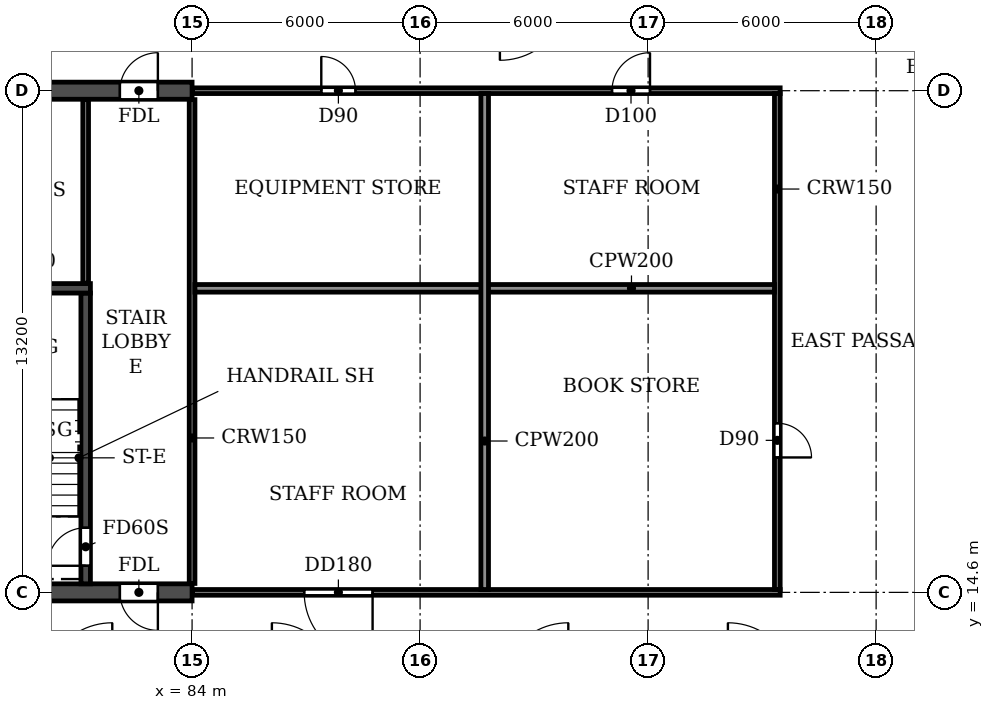
"""IFC4 building model, lengths in metres.
Left out: names, types, materials, properties, quantities, classifications, styles, units other than length and angle.
Written with IfcOpenShell. Run it as: python <this file> out.ifc"""

import sys

from ifc_helpers import new_model, si_unit, direction, frame, frame_2d, origin, place, context, subcontext, project, spatial, rectangle, extrude, element, fill, save


model = new_model("IFC4")
c1 = context("Model", 3, precision=1e-05, world=origin(), true_north=direction((0.0, 1.0)))
c2 = subcontext(c1, "Body", "Model", "MODEL_VIEW")
j1 = project(units=[si_unit("LENGTHUNIT", "METRE"), si_unit("PLANEANGLEUNIT", "RADIAN")], contexts=[c1])
p1 = place(None, origin())
s1 = spatial("IfcSite", under=j1, at=p1, CompositionType="ELEMENT")
p2 = place(p1, origin())
s2 = spatial("IfcBuilding", under=s1, at=p2, CompositionType="ELEMENT")
p3 = place(p2, frame((0.0, 0.0, 15.0)))
s3 = spatial("IfcBuildingStorey", under=s2, at=p3, CompositionType="ELEMENT", Elevation=15.0)
p4 = place(p3, frame((18.0, 14.6, 0.0), z_axis=(0.0, 0.0, 1.0), x_axis=(1.0, 0.0, 0.0)))
e1 = element("IfcWall", 1, at=p4, inside=s3, PredefinedType="SOLIDWALL", context=c2, shape_type="SweptSolid", body=[
    extrude(rectangle(XDim=66.0, YDim=0.45, at=frame_2d((33.0, 0.0))), origin(), (0.0, 0.0, 1.0), 3.92),
])
p5 = place(p4, frame((0.9, 0.0, 0.0)))
e2 = element("IfcOpeningElement", 2, at=p5, cuts=e1, PredefinedType="OPENING", context=c2, shape_type="SweptSolid", body=[
    extrude(rectangle(XDim=1.0, YDim=2.1, at=frame_2d((0.5, 1.05))), frame((0.0, 0.235, 0.0), z_axis=(0.0, -1.0, 0.0), x_axis=(1.0, 0.0, 0.0)), (0.0, 0.0, 1.0), 0.47),
])
p6 = place(p4, frame((8.8, 0.0, 0.0)))
e3 = element("IfcOpeningElement", 3, at=p6, cuts=e1, PredefinedType="OPENING", context=c2, shape_type="SweptSolid", body=[
    extrude(rectangle(XDim=1.0, YDim=2.1, at=frame_2d((0.5, 1.05))), frame((0.0, 0.235, 0.0), z_axis=(0.0, -1.0, 0.0), x_axis=(1.0, 0.0, 0.0)), (0.0, 0.0, 1.0), 0.47),
])
p7 = place(p4, frame((13.4, 0.0, 0.0)))
e4 = element("IfcOpeningElement", 4, at=p7, cuts=e1, PredefinedType="OPENING", context=c2, shape_type="SweptSolid", body=[
    extrude(rectangle(XDim=1.0, YDim=2.1, at=frame_2d((0.5, 1.05))), frame((0.0, 0.235, 0.0), z_axis=(0.0, -1.0, 0.0), x_axis=(1.0, 0.0, 0.0)), (0.0, 0.0, 1.0), 0.47),
])
p8 = place(p4, frame((26.0, 0.0, 0.0)))
e5 = element("IfcOpeningElement", 5, at=p8, cuts=e1, PredefinedType="OPENING", context=c2, shape_type="SweptSolid", body=[
    extrude(rectangle(XDim=1.0, YDim=2.1, at=frame_2d((0.5, 1.05))), frame((0.0, 0.235, 0.0), z_axis=(0.0, -1.0, 0.0), x_axis=(1.0, 0.0, 0.0)), (0.0, 0.0, 1.0), 0.47),
])
p9 = place(p4, frame((29.9, 0.0, 0.0)))
e6 = element("IfcOpeningElement", 6, at=p9, cuts=e1, PredefinedType="OPENING", context=c2, shape_type="SweptSolid", body=[
    extrude(rectangle(XDim=1.0, YDim=2.1, at=frame_2d((0.5, 1.05))), frame((0.0, 0.235, 0.0), z_axis=(0.0, -1.0, 0.0), x_axis=(1.0, 0.0, 0.0)), (0.0, 0.0, 1.0), 0.47),
])
p10 = place(p4, frame((32.5, 0.0, 0.0)))
e7 = element("IfcOpeningElement", 7, at=p10, cuts=e1, PredefinedType="OPENING", context=c2, shape_type="SweptSolid", body=[
    extrude(rectangle(XDim=1.0, YDim=2.1, at=frame_2d((0.5, 1.05))), frame((0.0, 0.235, 0.0), z_axis=(0.0, -1.0, 0.0), x_axis=(1.0, 0.0, 0.0)), (0.0, 0.0, 1.0), 0.47),
])
p11 = place(p4, frame((35.1, 0.0, 0.0)))
e8 = element("IfcOpeningElement", 8, at=p11, cuts=e1, PredefinedType="OPENING", context=c2, shape_type="SweptSolid", body=[
    extrude(rectangle(XDim=1.0, YDim=2.1, at=frame_2d((0.5, 1.05))), frame((0.0, 0.235, 0.0), z_axis=(0.0, -1.0, 0.0), x_axis=(1.0, 0.0, 0.0)), (0.0, 0.0, 1.0), 0.47),
])
p12 = place(p4, frame((39.0, 0.0, 0.0)))
e9 = element("IfcOpeningElement", 9, at=p12, cuts=e1, PredefinedType="OPENING", context=c2, shape_type="SweptSolid", body=[
    extrude(rectangle(XDim=1.0, YDim=2.1, at=frame_2d((0.5, 1.05))), frame((0.0, 0.235, 0.0), z_axis=(0.0, -1.0, 0.0), x_axis=(1.0, 0.0, 0.0)), (0.0, 0.0, 1.0), 0.47),
])
p13 = place(p4, frame((51.6, 0.0, 0.0)))
e10 = element("IfcOpeningElement", 10, at=p13, cuts=e1, PredefinedType="OPENING", context=c2, shape_type="SweptSolid", body=[
    extrude(rectangle(XDim=1.0, YDim=2.1, at=frame_2d((0.5, 1.05))), frame((0.0, 0.235, 0.0), z_axis=(0.0, -1.0, 0.0), x_axis=(1.0, 0.0, 0.0)), (0.0, 0.0, 1.0), 0.47),
])
p14 = place(p4, frame((56.25, 0.0, 0.0)))
e11 = element("IfcOpeningElement", 11, at=p14, cuts=e1, PredefinedType="OPENING", context=c2, shape_type="SweptSolid", body=[
    extrude(rectangle(XDim=0.9, YDim=2.1, at=frame_2d((0.45, 1.05))), frame((0.0, 0.235, 0.0), z_axis=(0.0, -1.0, 0.0), x_axis=(1.0, 0.0, 0.0)), (0.0, 0.0, 1.0), 0.47),
])
p15 = place(p4, frame((64.1, 0.0, 0.0)))
e12 = element("IfcOpeningElement", 12, at=p15, cuts=e1, PredefinedType="OPENING", context=c2, shape_type="SweptSolid", body=[
    extrude(rectangle(XDim=1.0, YDim=2.1, at=frame_2d((0.5, 1.05))), frame((0.0, 0.235, 0.0), z_axis=(0.0, -1.0, 0.0), x_axis=(1.0, 0.0, 0.0)), (0.0, 0.0, 1.0), 0.47),
])
p16 = place(p3, frame((18.0, 27.8, 0.0), z_axis=(0.0, 0.0, 1.0), x_axis=(1.0, 0.0, 0.0)))
e13 = element("IfcWall", 13, at=p16, inside=s3, PredefinedType="SOLIDWALL", context=c2, shape_type="SweptSolid", body=[
    extrude(rectangle(XDim=66.0, YDim=0.45, at=frame_2d((33.0, 0.0))), origin(), (0.0, 0.0, 1.0), 3.92),
])
p17 = place(p16, frame((0.9, 0.0, 0.0)))
e14 = element("IfcOpeningElement", 14, at=p17, cuts=e13, PredefinedType="OPENING", context=c2, shape_type="SweptSolid", body=[
    extrude(rectangle(XDim=1.0, YDim=2.1, at=frame_2d((0.5, 1.05))), frame((0.0, 0.235, 0.0), z_axis=(0.0, -1.0, 0.0), x_axis=(1.0, 0.0, 0.0)), (0.0, 0.0, 1.0), 0.47),
])
p18 = place(p16, frame((4.25, 0.0, 0.0)))
e15 = element("IfcOpeningElement", 15, at=p18, cuts=e13, PredefinedType="OPENING", context=c2, shape_type="SweptSolid", body=[
    extrude(rectangle(XDim=0.9, YDim=2.1, at=frame_2d((0.45, 1.05))), frame((0.0, 0.235, 0.0), z_axis=(0.0, -1.0, 0.0), x_axis=(1.0, 0.0, 0.0)), (0.0, 0.0, 1.0), 0.47),
])
p19 = place(p16, frame((8.85, 0.0, 0.0)))
e16 = element("IfcOpeningElement", 16, at=p19, cuts=e13, PredefinedType="OPENING", context=c2, shape_type="SweptSolid", body=[
    extrude(rectangle(XDim=0.9, YDim=2.1, at=frame_2d((0.45, 1.05))), frame((0.0, 0.235, 0.0), z_axis=(0.0, -1.0, 0.0), x_axis=(1.0, 0.0, 0.0)), (0.0, 0.0, 1.0), 0.47),
])
p20 = place(p16, frame((13.45, 0.0, 0.0)))
e17 = element("IfcOpeningElement", 17, at=p20, cuts=e13, PredefinedType="OPENING", context=c2, shape_type="SweptSolid", body=[
    extrude(rectangle(XDim=0.9, YDim=2.1, at=frame_2d((0.45, 1.05))), frame((0.0, 0.235, 0.0), z_axis=(0.0, -1.0, 0.0), x_axis=(1.0, 0.0, 0.0)), (0.0, 0.0, 1.0), 0.47),
])
p21 = place(p16, frame((16.6, 0.0, 0.0)))
e18 = element("IfcOpeningElement", 18, at=p21, cuts=e13, PredefinedType="OPENING", context=c2, shape_type="SweptSolid", body=[
    extrude(rectangle(XDim=1.0, YDim=2.1, at=frame_2d((0.5, 1.05))), frame((0.0, 0.235, 0.0), z_axis=(0.0, -1.0, 0.0), x_axis=(1.0, 0.0, 0.0)), (0.0, 0.0, 1.0), 0.47),
])
p22 = place(p16, frame((21.8, 0.0, 0.0)))
e19 = element("IfcOpeningElement", 19, at=p22, cuts=e13, PredefinedType="OPENING", context=c2, shape_type="SweptSolid", body=[
    extrude(rectangle(XDim=1.0, YDim=2.1, at=frame_2d((0.5, 1.05))), frame((0.0, 0.235, 0.0), z_axis=(0.0, -1.0, 0.0), x_axis=(1.0, 0.0, 0.0)), (0.0, 0.0, 1.0), 0.47),
])
p23 = place(p16, frame((29.6, 0.0, 0.0)))
e20 = element("IfcOpeningElement", 20, at=p23, cuts=e13, PredefinedType="OPENING", context=c2, shape_type="SweptSolid", body=[
    extrude(rectangle(XDim=1.0, YDim=2.1, at=frame_2d((0.5, 1.05))), frame((0.0, 0.235, 0.0), z_axis=(0.0, -1.0, 0.0), x_axis=(1.0, 0.0, 0.0)), (0.0, 0.0, 1.0), 0.47),
])
p24 = place(p16, frame((32.5, 0.0, 0.0)))
e21 = element("IfcOpeningElement", 21, at=p24, cuts=e13, PredefinedType="OPENING", context=c2, shape_type="SweptSolid", body=[
    extrude(rectangle(XDim=1.0, YDim=2.1, at=frame_2d((0.5, 1.05))), frame((0.0, 0.235, 0.0), z_axis=(0.0, -1.0, 0.0), x_axis=(1.0, 0.0, 0.0)), (0.0, 0.0, 1.0), 0.47),
])
p25 = place(p16, frame((35.4, 0.0, 0.0)))
e22 = element("IfcOpeningElement", 22, at=p25, cuts=e13, PredefinedType="OPENING", context=c2, shape_type="SweptSolid", body=[
    extrude(rectangle(XDim=1.0, YDim=2.1, at=frame_2d((0.5, 1.05))), frame((0.0, 0.235, 0.0), z_axis=(0.0, -1.0, 0.0), x_axis=(1.0, 0.0, 0.0)), (0.0, 0.0, 1.0), 0.47),
])
p26 = place(p16, frame((39.3, 0.0, 0.0)))
e23 = element("IfcOpeningElement", 23, at=p26, cuts=e13, PredefinedType="OPENING", context=c2, shape_type="SweptSolid", body=[
    extrude(rectangle(XDim=1.0, YDim=2.1, at=frame_2d((0.5, 1.05))), frame((0.0, 0.235, 0.0), z_axis=(0.0, -1.0, 0.0), x_axis=(1.0, 0.0, 0.0)), (0.0, 0.0, 1.0), 0.47),
])
p27 = place(p16, frame((43.2, 0.0, 0.0)))
e24 = element("IfcOpeningElement", 24, at=p27, cuts=e13, PredefinedType="OPENING", context=c2, shape_type="SweptSolid", body=[
    extrude(rectangle(XDim=1.0, YDim=2.1, at=frame_2d((0.5, 1.05))), frame((0.0, 0.235, 0.0), z_axis=(0.0, -1.0, 0.0), x_axis=(1.0, 0.0, 0.0)), (0.0, 0.0, 1.0), 0.47),
])
p28 = place(p16, frame((45.8, 0.0, 0.0)))
e25 = element("IfcOpeningElement", 25, at=p28, cuts=e13, PredefinedType="OPENING", context=c2, shape_type="SweptSolid", body=[
    extrude(rectangle(XDim=1.0, YDim=2.1, at=frame_2d((0.5, 1.05))), frame((0.0, 0.235, 0.0), z_axis=(0.0, -1.0, 0.0), x_axis=(1.0, 0.0, 0.0)), (0.0, 0.0, 1.0), 0.47),
])
p29 = place(p16, frame((48.4, 0.0, 0.0)))
e26 = element("IfcOpeningElement", 26, at=p29, cuts=e13, PredefinedType="OPENING", context=c2, shape_type="SweptSolid", body=[
    extrude(rectangle(XDim=1.0, YDim=2.1, at=frame_2d((0.5, 1.05))), frame((0.0, 0.235, 0.0), z_axis=(0.0, -1.0, 0.0), x_axis=(1.0, 0.0, 0.0)), (0.0, 0.0, 1.0), 0.47),
])
p30 = place(p16, frame((51.65, 0.0, 0.0)))
e27 = element("IfcOpeningElement", 27, at=p30, cuts=e13, PredefinedType="OPENING", context=c2, shape_type="SweptSolid", body=[
    extrude(rectangle(XDim=0.9, YDim=2.1, at=frame_2d((0.45, 1.05))), frame((0.0, 0.235, 0.0), z_axis=(0.0, -1.0, 0.0), x_axis=(1.0, 0.0, 0.0)), (0.0, 0.0, 1.0), 0.47),
])
p31 = place(p16, frame((56.2, 0.0, 0.0)))
e28 = element("IfcOpeningElement", 28, at=p31, cuts=e13, PredefinedType="OPENING", context=c2, shape_type="SweptSolid", body=[
    extrude(rectangle(XDim=1.0, YDim=2.1, at=frame_2d((0.5, 1.05))), frame((0.0, 0.235, 0.0), z_axis=(0.0, -1.0, 0.0), x_axis=(1.0, 0.0, 0.0)), (0.0, 0.0, 1.0), 0.47),
])
p32 = place(p16, frame((60.85, 0.0, 0.0)))
e29 = element("IfcOpeningElement", 29, at=p32, cuts=e13, PredefinedType="OPENING", context=c2, shape_type="SweptSolid", body=[
    extrude(rectangle(XDim=0.9, YDim=2.1, at=frame_2d((0.45, 1.05))), frame((0.0, 0.235, 0.0), z_axis=(0.0, -1.0, 0.0), x_axis=(1.0, 0.0, 0.0)), (0.0, 0.0, 1.0), 0.47),
])
p33 = place(p16, frame((64.1, 0.0, 0.0)))
e30 = element("IfcOpeningElement", 30, at=p33, cuts=e13, PredefinedType="OPENING", context=c2, shape_type="SweptSolid", body=[
    extrude(rectangle(XDim=1.0, YDim=2.1, at=frame_2d((0.5, 1.05))), frame((0.0, 0.235, 0.0), z_axis=(0.0, -1.0, 0.0), x_axis=(1.0, 0.0, 0.0)), (0.0, 0.0, 1.0), 0.47),
])
p34 = place(p3, frame((81.2, 14.825, 0.0), z_axis=(0.0, 0.0, 1.0), x_axis=(0.0, 1.0, 0.0)))
e31 = element("IfcWall", 31, at=p34, inside=s3, PredefinedType="SOLIDWALL", context=c2, shape_type="SweptSolid", body=[
    extrude(rectangle(XDim=7.65, YDim=0.25, at=frame_2d((3.825, 0.0))), origin(), (0.0, 0.0, 1.0), 3.92),
])
p35 = place(p34, frame((0.475, 0.0, 0.0)))
e32 = element("IfcOpeningElement", 32, at=p35, cuts=e31, PredefinedType="OPENING", context=c2, shape_type="SweptSolid", body=[
    extrude(rectangle(XDim=1.0, YDim=2.1, at=frame_2d((0.5, 1.05))), frame((0.0, 0.135, 0.0), z_axis=(0.0, -1.0, 0.0), x_axis=(1.0, 0.0, 0.0)), (0.0, 0.0, 1.0), 0.27),
])
p36 = place(p3, frame((77.275, 22.6, 0.0), z_axis=(0.0, 0.0, 1.0), x_axis=(1.0, 0.0, 0.0)))
e33 = element("IfcWall", 33, at=p36, inside=s3, PredefinedType="SOLIDWALL", context=c2, shape_type="SweptSolid", body=[
    extrude(rectangle(XDim=4.05, YDim=0.25, at=frame_2d((2.025, 0.0))), origin(), (0.0, 0.0, 1.0), 3.92),
])
p37 = place(p3, frame((84.01, 14.6, 0.0), z_axis=(0.0, 0.0, 1.0), x_axis=(1.0, 0.0, 0.0)))
e34 = element("IfcWall", 34, at=p37, inside=s3, PredefinedType="PARTITIONING", context=c2, shape_type="SweptSolid", body=[
    extrude(rectangle(XDim=15.465, YDim=0.15, at=frame_2d((7.732, 0.0))), origin(), (0.0, 0.0, 1.0), 3.92),
])
p38 = place(p37, frame((2.94, 0.0, 0.0)))
e35 = element("IfcOpeningElement", 35, at=p38, cuts=e34, PredefinedType="OPENING", context=c2, shape_type="SweptSolid", body=[
    extrude(rectangle(XDim=1.8, YDim=2.1, at=frame_2d((0.9, 1.05))), frame((0.0, 0.085, 0.0), z_axis=(0.0, -1.0, 0.0), x_axis=(1.0, 0.0, 0.0)), (0.0, 0.0, 1.0), 0.17),
])
p39 = place(p3, frame((84.01, 27.8, 0.0), z_axis=(0.0, 0.0, 1.0), x_axis=(1.0, 0.0, 0.0)))
e36 = element("IfcWall", 36, at=p39, inside=s3, PredefinedType="PARTITIONING", context=c2, shape_type="SweptSolid", body=[
    extrude(rectangle(XDim=15.465, YDim=0.15, at=frame_2d((7.732, 0.0))), origin(), (0.0, 0.0, 1.0), 3.92),
])
p40 = place(p39, frame((3.39, 0.0, 0.0)))
e37 = element("IfcOpeningElement", 37, at=p40, cuts=e36, PredefinedType="OPENING", context=c2, shape_type="SweptSolid", body=[
    extrude(rectangle(XDim=0.9, YDim=2.1, at=frame_2d((0.45, 1.05))), frame((0.0, 0.085, 0.0), z_axis=(0.0, -1.0, 0.0), x_axis=(1.0, 0.0, 0.0)), (0.0, 0.0, 1.0), 0.17),
])
p41 = place(p39, frame((11.04, 0.0, 0.0)))
e38 = element("IfcOpeningElement", 38, at=p41, cuts=e36, PredefinedType="OPENING", context=c2, shape_type="SweptSolid", body=[
    extrude(rectangle(XDim=1.0, YDim=2.1, at=frame_2d((0.5, 1.05))), frame((0.0, 0.085, 0.0), z_axis=(0.0, -1.0, 0.0), x_axis=(1.0, 0.0, 0.0)), (0.0, 0.0, 1.0), 0.17),
])
p42 = place(p3, frame((84.0, 14.835, 0.0), z_axis=(0.0, 0.0, 1.0), x_axis=(0.0, 1.0, 0.0)))
e39 = element("IfcWall", 39, at=p42, inside=s3, PredefinedType="PARTITIONING", context=c2, shape_type="SweptSolid", body=[
    extrude(rectangle(XDim=12.73, YDim=0.15, at=frame_2d((6.365, 0.0))), origin(), (0.0, 0.0, 1.0), 3.92),
])
p43 = place(p3, frame((99.4, 14.675, 0.0), z_axis=(0.0, 0.0, 1.0), x_axis=(0.0, 1.0, 0.0)))
e40 = element("IfcWall", 40, at=p43, inside=s3, PredefinedType="PARTITIONING", context=c2, shape_type="SweptSolid", body=[
    extrude(rectangle(XDim=13.05, YDim=0.15, at=frame_2d((6.525, 0.0))), origin(), (0.0, 0.0, 1.0), 3.92),
])
p44 = place(p43, frame((3.475, 0.0, 0.0)))
e41 = element("IfcOpeningElement", 41, at=p44, cuts=e40, PredefinedType="OPENING", context=c2, shape_type="SweptSolid", body=[
    extrude(rectangle(XDim=0.9, YDim=2.1, at=frame_2d((0.45, 1.05))), frame((0.0, 0.085, 0.0), z_axis=(0.0, -1.0, 0.0), x_axis=(1.0, 0.0, 0.0)), (0.0, 0.0, 1.0), 0.17),
])
p45 = place(p3, frame((84.075, 22.6, 0.0), z_axis=(0.0, 0.0, 1.0), x_axis=(1.0, 0.0, 0.0)))
e42 = element("IfcWall", 42, at=p45, inside=s3, PredefinedType="PARTITIONING", context=c2, shape_type="SweptSolid", body=[
    extrude(rectangle(XDim=15.25, YDim=0.2, at=frame_2d((7.625, 0.0))), origin(), (0.0, 0.0, 1.0), 3.92),
])
p46 = place(p3, frame((91.7, 14.675, 0.0), z_axis=(0.0, 0.0, 1.0), x_axis=(0.0, 1.0, 0.0)))
e43 = element("IfcWall", 43, at=p46, inside=s3, PredefinedType="PARTITIONING", context=c2, shape_type="SweptSolid", body=[
    extrude(rectangle(XDim=13.05, YDim=0.2, at=frame_2d((6.525, 0.0))), origin(), (0.0, 0.0, 1.0), 3.92),
])
p47 = place(p3, frame((81.2, 22.735, 0.0), z_axis=(0.0, 0.0, 1.0), x_axis=(0.0, 1.0, 0.0)))
e44 = element("IfcWall", 44, at=p47, inside=s3, PredefinedType="PARTITIONING", context=c2, shape_type="SweptSolid", body=[
    extrude(rectangle(XDim=4.83, YDim=0.15, at=frame_2d((2.415, 0.0))), origin(), (0.0, 0.0, 1.0), 3.92),
])
p48 = place(p44, frame((0.9, 0.0, 0.0), z_axis=(0.0, 0.0, 1.0), x_axis=(-1.0, 0.0, 0.0)))
e45 = element("IfcDoor", 45, at=p48, inside=s3, OperationType="SINGLE_SWING_RIGHT", PredefinedType="DOOR", context=c2, shape_type="SweptSolid", body=[
    extrude(rectangle(XDim=0.9, YDim=2.1, at=frame_2d((0.45, 1.05))), frame((0.0, 0.025, 0.0), z_axis=(0.0, -1.0, 0.0), x_axis=(1.0, 0.0, 0.0)), (0.0, 0.0, 1.0), 0.05),
])
fill(e41, e45)
p49 = place(p33, origin())
e46 = element("IfcDoor", 46, at=p49, inside=s3, OperationType="SINGLE_SWING_RIGHT", PredefinedType="DOOR", context=c2, shape_type="SweptSolid", body=[
    extrude(rectangle(XDim=1.0, YDim=2.1, at=frame_2d((0.5, 1.05))), frame((0.0, 0.025, 0.0), z_axis=(0.0, -1.0, 0.0), x_axis=(1.0, 0.0, 0.0)), (0.0, 0.0, 1.0), 0.05),
])
fill(e30, e46)
p50 = place(p40, origin())
e47 = element("IfcDoor", 47, at=p50, inside=s3, OperationType="SINGLE_SWING_LEFT", PredefinedType="DOOR", context=c2, shape_type="SweptSolid", body=[
    extrude(rectangle(XDim=0.9, YDim=2.1, at=frame_2d((0.45, 1.05))), frame((0.0, 0.025, 0.0), z_axis=(0.0, -1.0, 0.0), x_axis=(1.0, 0.0, 0.0)), (0.0, 0.0, 1.0), 0.05),
])
fill(e37, e47)
p51 = place(p41, origin())
e48 = element("IfcDoor", 48, at=p51, inside=s3, OperationType="SINGLE_SWING_RIGHT", PredefinedType="DOOR", context=c2, shape_type="SweptSolid", body=[
    extrude(rectangle(XDim=1.0, YDim=2.1, at=frame_2d((0.5, 1.05))), frame((0.0, 0.025, 0.0), z_axis=(0.0, -1.0, 0.0), x_axis=(1.0, 0.0, 0.0)), (0.0, 0.0, 1.0), 0.05),
])
fill(e38, e48)
p52 = place(p15, frame((1.0, 0.0, 0.0), z_axis=(0.0, 0.0, 1.0), x_axis=(-1.0, 0.0, 0.0)))
e49 = element("IfcDoor", 49, at=p52, inside=s3, OperationType="SINGLE_SWING_LEFT", PredefinedType="DOOR", context=c2, shape_type="SweptSolid", body=[
    extrude(rectangle(XDim=1.0, YDim=2.1, at=frame_2d((0.5, 1.05))), frame((0.0, 0.025, 0.0), z_axis=(0.0, -1.0, 0.0), x_axis=(1.0, 0.0, 0.0)), (0.0, 0.0, 1.0), 0.05),
])
fill(e12, e49)
p53 = place(p38, frame((1.8, 0.0, 0.0), z_axis=(0.0, 0.0, 1.0), x_axis=(-1.0, 0.0, 0.0)))
e50 = element("IfcDoor", 50, at=p53, inside=s3, OperationType="DOUBLE_DOOR_SINGLE_SWING", PredefinedType="DOOR", context=c2, shape_type="SweptSolid", body=[
    extrude(rectangle(XDim=1.8, YDim=2.1, at=frame_2d((0.9, 1.05))), frame((0.0, 0.025, 0.0), z_axis=(0.0, -1.0, 0.0), x_axis=(1.0, 0.0, 0.0)), (0.0, 0.0, 1.0), 0.05),
])
fill(e35, e50)
p54 = place(p35, origin())
e51 = element("IfcDoor", 51, at=p54, inside=s3, OperationType="SINGLE_SWING_LEFT", PredefinedType="DOOR", context=c2, shape_type="SweptSolid", body=[
    extrude(rectangle(XDim=1.0, YDim=2.1, at=frame_2d((0.5, 1.05))), frame((0.0, 0.025, 0.0), z_axis=(0.0, -1.0, 0.0), x_axis=(1.0, 0.0, 0.0)), (0.0, 0.0, 1.0), 0.05),
])
fill(e32, e51)
save(model, sys.argv[1])
